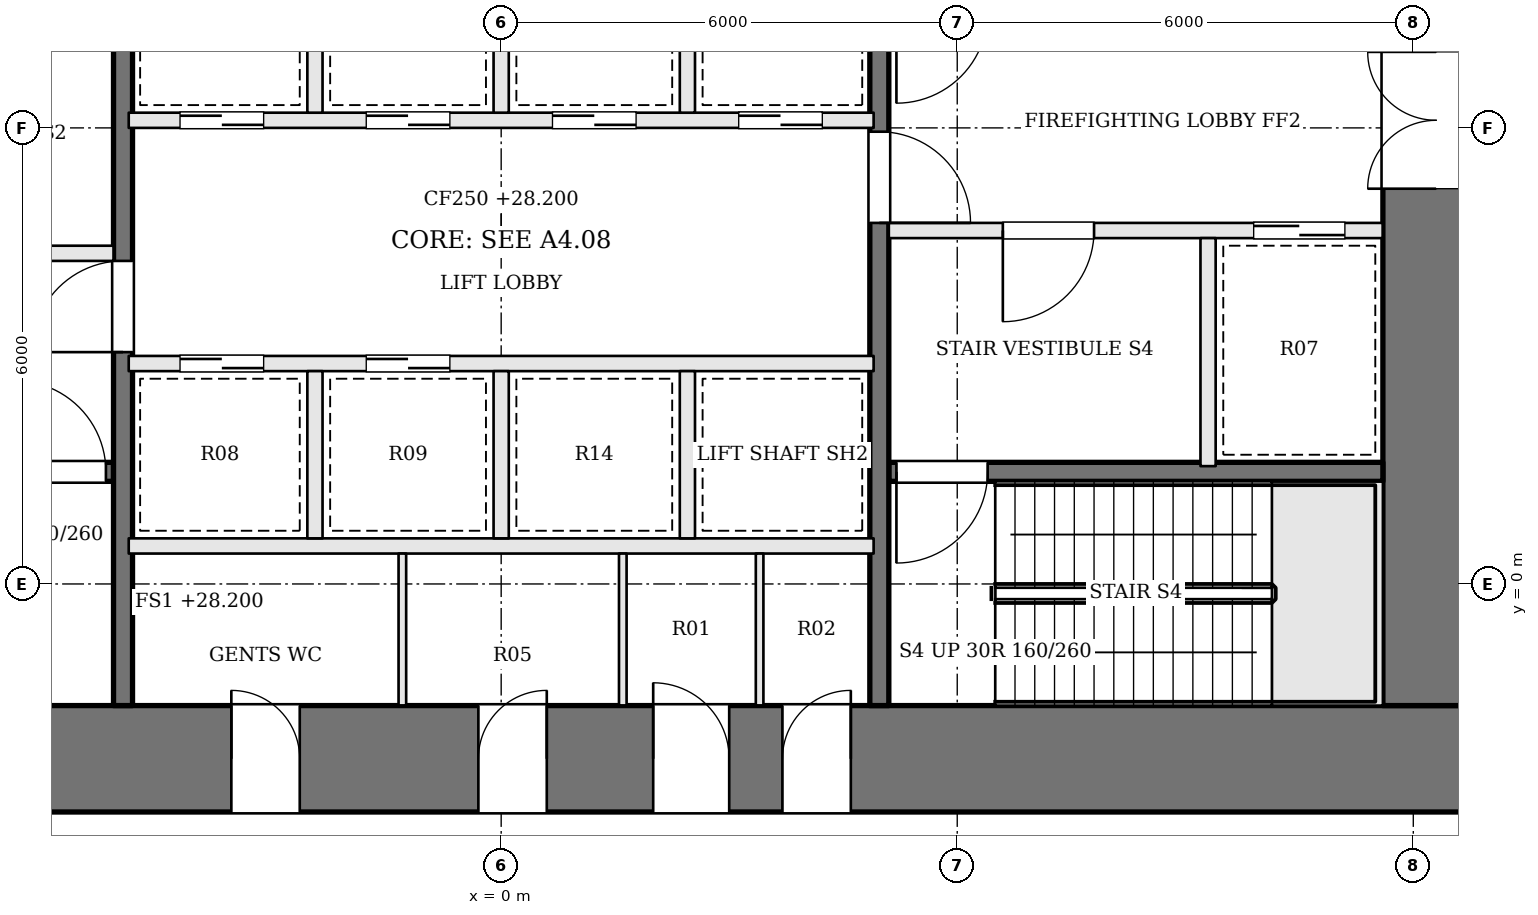
"""IFC4 building model, lengths in metres.
Left out: names, types, materials, properties, quantities, classifications, styles, units other than length and angle.
Written with IfcOpenShell. Run it as: python <this file> out.ifc"""

import sys

from ifc_helpers import new_model, si_unit, direction, frame, frame_2d, origin, place, context, subcontext, project, spatial, rectangle, extrude, element, fill, save


model = new_model("IFC4")
c1 = context("Model", 3, precision=1e-05, world=origin(), true_north=direction((0.0, 1.0)))
c2 = subcontext(c1, "Body", "Model", "MODEL_VIEW")
j1 = project(units=[si_unit("LENGTHUNIT", "METRE"), si_unit("PLANEANGLEUNIT", "RADIAN")], contexts=[c1])
p1 = place(None, origin())
s1 = spatial("IfcSite", under=j1, at=p1, CompositionType="ELEMENT")
p2 = place(p1, origin())
s2 = spatial("IfcBuilding", under=s1, at=p2, CompositionType="ELEMENT")
p3 = place(p2, frame((0.0, 0.0, 28.2)))
s3 = spatial("IfcBuildingStorey", under=s2, at=p3, CompositionType="ELEMENT", Elevation=28.2)
p4 = place(p3, frame((-13.0, -2.3, 0.0), z_axis=(0.0, 0.0, 1.0), x_axis=(1.0, 0.0, 0.0)))
e1 = element("IfcWall", 1, at=p4, inside=s3, PredefinedType="SHEAR", context=c2, shape_type="SweptSolid", body=[
    extrude(rectangle(XDim=26.0, YDim=1.4, at=frame_2d((13.0, 0.0))), origin(), (0.0, 0.0, 1.0), 4.8),
])
p5 = place(p4, frame((9.45, 0.0, 0.0)))
e2 = element("IfcOpeningElement", 2, at=p5, cuts=e1, PredefinedType="OPENING", context=c2, shape_type="SweptSolid", body=[
    extrude(rectangle(XDim=0.9, YDim=2.1, at=frame_2d((0.45, 1.05))), frame((0.0, 0.71, 0.0), z_axis=(0.0, -1.0, 0.0), x_axis=(1.0, 0.0, 0.0)), (0.0, 0.0, 1.0), 1.42),
])
p6 = place(p4, frame((12.7, 0.0, 0.0)))
e3 = element("IfcOpeningElement", 3, at=p6, cuts=e1, PredefinedType="OPENING", context=c2, shape_type="SweptSolid", body=[
    extrude(rectangle(XDim=0.9, YDim=2.1, at=frame_2d((0.45, 1.05))), frame((0.0, 0.71, 0.0), z_axis=(0.0, -1.0, 0.0), x_axis=(1.0, 0.0, 0.0)), (0.0, 0.0, 1.0), 1.42),
])
p7 = place(p4, frame((15.0, 0.0, 0.0)))
e4 = element("IfcOpeningElement", 4, at=p7, cuts=e1, PredefinedType="OPENING", context=c2, shape_type="SweptSolid", body=[
    extrude(rectangle(XDim=1.0, YDim=2.1, at=frame_2d((0.5, 1.05))), frame((0.0, 0.71, 0.0), z_axis=(0.0, -1.0, 0.0), x_axis=(1.0, 0.0, 0.0)), (0.0, 0.0, 1.0), 1.42),
])
p8 = place(p4, frame((16.7, 0.0, 0.0)))
e5 = element("IfcOpeningElement", 5, at=p8, cuts=e1, PredefinedType="OPENING", context=c2, shape_type="SweptSolid", body=[
    extrude(rectangle(XDim=0.9, YDim=2.1, at=frame_2d((0.45, 1.05))), frame((0.0, 0.71, 0.0), z_axis=(0.0, -1.0, 0.0), x_axis=(1.0, 0.0, 0.0)), (0.0, 0.0, 1.0), 1.42),
])
p9 = place(p3, frame((12.3, -1.6, 0.0), z_axis=(0.0, 0.0, 1.0), x_axis=(0.0, 1.0, 0.0)))
e6 = element("IfcWall", 6, at=p9, inside=s3, PredefinedType="SHEAR", context=c2, shape_type="SweptSolid", body=[
    extrude(rectangle(XDim=12.2, YDim=1.4, at=frame_2d((6.1, 0.0))), origin(), (0.0, 0.0, 1.0), 4.8),
])
p10 = place(p9, frame((6.8, 0.0, 0.0)))
e7 = element("IfcOpeningElement", 7, at=p10, cuts=e6, PredefinedType="OPENING", context=c2, shape_type="SweptSolid", body=[
    extrude(rectangle(XDim=1.8, YDim=2.1, at=frame_2d((0.9, 1.05))), frame((0.0, 0.71, 0.0), z_axis=(0.0, -1.0, 0.0), x_axis=(1.0, 0.0, 0.0)), (0.0, 0.0, 1.0), 1.42),
])
p11 = place(p3, frame((-11.6, 1.475, 0.0), z_axis=(0.0, 0.0, 1.0), x_axis=(1.0, 0.0, 0.0)))
e8 = element("IfcWall", 8, at=p11, inside=s3, PredefinedType="SOLIDWALL", context=c2, shape_type="SweptSolid", body=[
    extrude(rectangle(XDim=6.5, YDim=0.25, at=frame_2d((3.25, 0.0))), origin(), (0.0, 0.0, 1.0), 4.5),
])
p12 = place(p11, frame((5.2, 0.0, 0.0)))
e9 = element("IfcOpeningElement", 9, at=p12, cuts=e8, PredefinedType="OPENING", context=c2, shape_type="SweptSolid", body=[
    extrude(rectangle(XDim=1.2, YDim=2.1, at=frame_2d((0.6, 1.05))), frame((0.0, 0.135, 0.0), z_axis=(0.0, -1.0, 0.0), x_axis=(1.0, 0.0, 0.0)), (0.0, 0.0, 1.0), 0.27),
])
p13 = place(p3, frame((-11.6, 4.35, 0.0), z_axis=(0.0, 0.0, 1.0), x_axis=(1.0, 0.0, 0.0)))
e10 = element("IfcWall", 10, at=p13, inside=s3, PredefinedType="SOLIDWALL", context=c2, shape_type="SweptSolid", body=[
    extrude(rectangle(XDim=6.5, YDim=0.2, at=frame_2d((3.25, 0.0))), origin(), (0.0, 0.0, 1.0), 4.5),
])
p14 = place(p13, frame((3.8, 0.0, 0.0)))
e11 = element("IfcOpeningElement", 11, at=p14, cuts=e10, PredefinedType="OPENING", context=c2, shape_type="SweptSolid", body=[
    extrude(rectangle(XDim=1.2, YDim=2.1, at=frame_2d((0.6, 1.05))), frame((0.0, 0.11, 0.0), z_axis=(0.0, -1.0, 0.0), x_axis=(1.0, 0.0, 0.0)), (0.0, 0.0, 1.0), 0.22),
])
p15 = place(p13, frame((0.5, 0.0, 0.0)))
e12 = element("IfcOpeningElement", 12, at=p15, cuts=e10, PredefinedType="OPENING", context=c2, shape_type="SweptSolid", body=[
    extrude(rectangle(XDim=1.2, YDim=2.1, at=frame_2d((0.6, 1.05))), frame((0.0, 0.11, 0.0), z_axis=(0.0, -1.0, 0.0), x_axis=(1.0, 0.0, 0.0)), (0.0, 0.0, 1.0), 0.22),
])
p16 = place(p3, frame((11.6, 4.65, 0.0), z_axis=(0.0, 0.0, 1.0), x_axis=(-1.0, 0.0, 0.0)))
e13 = element("IfcWall", 13, at=p16, inside=s3, PredefinedType="SOLIDWALL", context=c2, shape_type="SweptSolid", body=[
    extrude(rectangle(XDim=6.5, YDim=0.2, at=frame_2d((3.25, 0.0))), origin(), (0.0, 0.0, 1.0), 4.5),
])
p17 = place(p16, frame((3.8, 0.0, 0.0)))
e14 = element("IfcOpeningElement", 14, at=p17, cuts=e13, PredefinedType="OPENING", context=c2, shape_type="SweptSolid", body=[
    extrude(rectangle(XDim=1.2, YDim=2.1, at=frame_2d((0.6, 1.05))), frame((0.0, 0.11, 0.0), z_axis=(0.0, -1.0, 0.0), x_axis=(1.0, 0.0, 0.0)), (0.0, 0.0, 1.0), 0.22),
])
p18 = place(p16, frame((0.5, 0.0, 0.0)))
e15 = element("IfcOpeningElement", 15, at=p18, cuts=e13, PredefinedType="OPENING", context=c2, shape_type="SweptSolid", body=[
    extrude(rectangle(XDim=1.2, YDim=2.1, at=frame_2d((0.6, 1.05))), frame((0.0, 0.11, 0.0), z_axis=(0.0, -1.0, 0.0), x_axis=(1.0, 0.0, 0.0)), (0.0, 0.0, 1.0), 0.22),
])
p19 = place(p3, frame((11.6, 1.475, 0.0), z_axis=(0.0, 0.0, 1.0), x_axis=(-1.0, 0.0, 0.0)))
e16 = element("IfcWall", 16, at=p19, inside=s3, PredefinedType="SOLIDWALL", context=c2, shape_type="SweptSolid", body=[
    extrude(rectangle(XDim=6.5, YDim=0.25, at=frame_2d((3.25, 0.0))), origin(), (0.0, 0.0, 1.0), 4.5),
])
p20 = place(p19, frame((5.2, 0.0, 0.0)))
e17 = element("IfcOpeningElement", 17, at=p20, cuts=e16, PredefinedType="OPENING", context=c2, shape_type="SweptSolid", body=[
    extrude(rectangle(XDim=1.2, YDim=2.1, at=frame_2d((0.6, 1.05))), frame((0.0, 0.135, 0.0), z_axis=(0.0, -1.0, 0.0), x_axis=(1.0, 0.0, 0.0)), (0.0, 0.0, 1.0), 0.27),
])
p21 = place(p3, frame((9.3, 4.55, 0.0), z_axis=(0.0, 0.0, 1.0), x_axis=(0.0, -1.0, 0.0)))
e18 = element("IfcWall", 18, at=p21, inside=s3, PredefinedType="SOLIDWALL", context=c2, shape_type="SweptSolid", body=[
    extrude(rectangle(XDim=3.0, YDim=0.2, at=frame_2d((1.5, 0.0))), origin(), (0.0, 0.0, 1.0), 4.5),
])
p22 = place(p3, frame((-4.975, -1.6, 0.0), z_axis=(0.0, 0.0, 1.0), x_axis=(0.0, 1.0, 0.0)))
e19 = element("IfcWall", 19, at=p22, inside=s3, PredefinedType="SOLIDWALL", context=c2, shape_type="SweptSolid", body=[
    extrude(rectangle(XDim=12.2, YDim=0.25, at=frame_2d((6.1, 0.0))), origin(), (0.0, 0.0, 1.0), 4.5),
])
p23 = place(p22, frame((4.65, 0.0, 0.0)))
e20 = element("IfcOpeningElement", 20, at=p23, cuts=e19, PredefinedType="OPENING", context=c2, shape_type="SweptSolid", body=[
    extrude(rectangle(XDim=1.2, YDim=2.1, at=frame_2d((0.6, 1.05))), frame((0.0, 0.135, 0.0), z_axis=(0.0, -1.0, 0.0), x_axis=(1.0, 0.0, 0.0)), (0.0, 0.0, 1.0), 0.27),
])
p24 = place(p3, frame((4.975, 10.6, 0.0), z_axis=(0.0, 0.0, 1.0), x_axis=(0.0, -1.0, 0.0)))
e21 = element("IfcWall", 21, at=p24, inside=s3, PredefinedType="SOLIDWALL", context=c2, shape_type="SweptSolid", body=[
    extrude(rectangle(XDim=12.2, YDim=0.25, at=frame_2d((6.1, 0.0))), origin(), (0.0, 0.0, 1.0), 4.5),
])
p25 = place(p24, frame((4.65, 0.0, 0.0)))
e22 = element("IfcOpeningElement", 22, at=p25, cuts=e21, PredefinedType="OPENING", context=c2, shape_type="SweptSolid", body=[
    extrude(rectangle(XDim=1.2, YDim=2.1, at=frame_2d((0.6, 1.05))), frame((0.0, 0.135, 0.0), z_axis=(0.0, -1.0, 0.0), x_axis=(1.0, 0.0, 0.0)), (0.0, 0.0, 1.0), 0.27),
])
p26 = place(p3, frame((-4.9, 0.5, 0.0), z_axis=(0.0, 0.0, 1.0), x_axis=(1.0, 0.0, 0.0)))
e23 = element("IfcWall", 23, at=p26, inside=s3, PredefinedType="SOLIDWALL", context=c2, shape_type="SweptSolid", body=[
    extrude(rectangle(XDim=9.8, YDim=0.2, at=frame_2d((4.9, 0.0))), origin(), (0.0, 0.0, 1.0), 4.5),
])
p27 = place(p3, frame((-4.9, 2.9, 0.0), z_axis=(0.0, 0.0, 1.0), x_axis=(1.0, 0.0, 0.0)))
e24 = element("IfcWall", 24, at=p27, inside=s3, PredefinedType="SOLIDWALL", context=c2, shape_type="SweptSolid", body=[
    extrude(rectangle(XDim=9.8, YDim=0.2, at=frame_2d((4.9, 0.0))), origin(), (0.0, 0.0, 1.0), 4.5),
])
p28 = place(p27, frame((0.675, 0.0, 0.0)))
e25 = element("IfcOpeningElement", 25, at=p28, cuts=e24, PredefinedType="OPENING", context=c2, shape_type="SweptSolid", body=[
    extrude(rectangle(XDim=1.1, YDim=2.1, at=frame_2d((0.55, 1.05))), frame((0.0, 0.11, 0.0), z_axis=(0.0, -1.0, 0.0), x_axis=(1.0, 0.0, 0.0)), (0.0, 0.0, 1.0), 0.22),
])
p29 = place(p27, frame((3.125, 0.0, 0.0)))
e26 = element("IfcOpeningElement", 26, at=p29, cuts=e24, PredefinedType="OPENING", context=c2, shape_type="SweptSolid", body=[
    extrude(rectangle(XDim=1.1, YDim=2.1, at=frame_2d((0.55, 1.05))), frame((0.0, 0.11, 0.0), z_axis=(0.0, -1.0, 0.0), x_axis=(1.0, 0.0, 0.0)), (0.0, 0.0, 1.0), 0.22),
])
p30 = place(p3, frame((-4.9, 6.1, 0.0), z_axis=(0.0, 0.0, 1.0), x_axis=(1.0, 0.0, 0.0)))
e27 = element("IfcWall", 27, at=p30, inside=s3, PredefinedType="SOLIDWALL", context=c2, shape_type="SweptSolid", body=[
    extrude(rectangle(XDim=9.8, YDim=0.2, at=frame_2d((4.9, 0.0))), origin(), (0.0, 0.0, 1.0), 4.5),
])
p31 = place(p30, frame((0.675, 0.0, 0.0)))
e28 = element("IfcOpeningElement", 28, at=p31, cuts=e27, PredefinedType="OPENING", context=c2, shape_type="SweptSolid", body=[
    extrude(rectangle(XDim=1.1, YDim=2.1, at=frame_2d((0.55, 1.05))), frame((0.0, 0.11, 0.0), z_axis=(0.0, -1.0, 0.0), x_axis=(1.0, 0.0, 0.0)), (0.0, 0.0, 1.0), 0.22),
])
p32 = place(p30, frame((3.125, 0.0, 0.0)))
e29 = element("IfcOpeningElement", 29, at=p32, cuts=e27, PredefinedType="OPENING", context=c2, shape_type="SweptSolid", body=[
    extrude(rectangle(XDim=1.1, YDim=2.1, at=frame_2d((0.55, 1.05))), frame((0.0, 0.11, 0.0), z_axis=(0.0, -1.0, 0.0), x_axis=(1.0, 0.0, 0.0)), (0.0, 0.0, 1.0), 0.22),
])
p33 = place(p30, frame((5.575, 0.0, 0.0)))
e30 = element("IfcOpeningElement", 30, at=p33, cuts=e27, PredefinedType="OPENING", context=c2, shape_type="SweptSolid", body=[
    extrude(rectangle(XDim=1.1, YDim=2.1, at=frame_2d((0.55, 1.05))), frame((0.0, 0.11, 0.0), z_axis=(0.0, -1.0, 0.0), x_axis=(1.0, 0.0, 0.0)), (0.0, 0.0, 1.0), 0.22),
])
p34 = place(p30, frame((8.025, 0.0, 0.0)))
e31 = element("IfcOpeningElement", 31, at=p34, cuts=e27, PredefinedType="OPENING", context=c2, shape_type="SweptSolid", body=[
    extrude(rectangle(XDim=1.1, YDim=2.1, at=frame_2d((0.55, 1.05))), frame((0.0, 0.11, 0.0), z_axis=(0.0, -1.0, 0.0), x_axis=(1.0, 0.0, 0.0)), (0.0, 0.0, 1.0), 0.22),
])
for number, where, z_axis, x_axis in (
    (32, (-2.45, 0.6, 0.0), (0.0, 0.0, 1.0), (0.0, 1.0, 0.0)),
    (33, (0.0, 0.6, 0.0), (0.0, 0.0, 1.0), (0.0, 1.0, 0.0)),
    (34, (2.45, 0.6, 0.0), (0.0, 0.0, 1.0), (0.0, 1.0, 0.0)),
    (35, (-2.45, 6.2, 0.0), (0.0, 0.0, 1.0), (0.0, 1.0, 0.0)),
    (36, (0.0, 6.2, 0.0), (0.0, 0.0, 1.0), (0.0, 1.0, 0.0)),
    (37, (2.45, 6.2, 0.0), (0.0, 0.0, 1.0), (0.0, 1.0, 0.0)),
):
    element("IfcWall", number, at=place(p3, frame(where, z_axis=z_axis, x_axis=x_axis)), inside=s3, PredefinedType="SOLIDWALL", context=c2, shape_type="SweptSolid", body=[
        extrude(rectangle(XDim=2.2, YDim=0.2, at=frame_2d((1.1, 0.0))), origin(), (0.0, 0.0, 1.0), 4.5),
    ])
for number, where, z_axis, x_axis in (
    (38, (-1.3, -1.6, 0.0), (0.0, 0.0, 1.0), (0.0, 1.0, 0.0)),
    (39, (1.6, -1.6, 0.0), (0.0, 0.0, 1.0), (0.0, 1.0, 0.0)),
    (40, (3.4, -1.6, 0.0), (0.0, 0.0, 1.0), (0.0, 1.0, 0.0)),
):
    element("IfcWall", number, at=place(p3, frame(where, z_axis=z_axis, x_axis=x_axis)), inside=s3, PredefinedType="PARTITIONING", context=c2, shape_type="SweptSolid", body=[
        extrude(rectangle(XDim=2.0, YDim=0.1, at=frame_2d((1.0, 0.0))), origin(), (0.0, 0.0, 1.0), 4.5),
    ])
p35 = place(p10, origin())
e41 = element("IfcDoor", 41, at=p35, inside=s3, OperationType="DOUBLE_DOOR_SINGLE_SWING", PredefinedType="DOOR", context=c2, shape_type="SweptSolid", body=[
    extrude(rectangle(XDim=1.8, YDim=2.1, at=frame_2d((0.9, 1.05))), frame((0.0, 0.025, 0.0), z_axis=(0.0, -1.0, 0.0), x_axis=(1.0, 0.0, 0.0)), (0.0, 0.0, 1.0), 0.05),
])
fill(e7, e41)
p36 = place(p23, origin())
e42 = element("IfcDoor", 42, at=p36, inside=s3, OperationType="SINGLE_SWING_LEFT", PredefinedType="DOOR", context=c2, shape_type="SweptSolid", body=[
    extrude(rectangle(XDim=1.2, YDim=2.1, at=frame_2d((0.6, 1.05))), frame((0.0, 0.025, 0.0), z_axis=(0.0, -1.0, 0.0), x_axis=(1.0, 0.0, 0.0)), (0.0, 0.0, 1.0), 0.05),
])
fill(e20, e42)
p37 = place(p25, origin())
e43 = element("IfcDoor", 43, at=p37, inside=s3, OperationType="SINGLE_SWING_RIGHT", PredefinedType="DOOR", context=c2, shape_type="SweptSolid", body=[
    extrude(rectangle(XDim=1.2, YDim=2.1, at=frame_2d((0.6, 1.05))), frame((0.0, 0.025, 0.0), z_axis=(0.0, -1.0, 0.0), x_axis=(1.0, 0.0, 0.0)), (0.0, 0.0, 1.0), 0.05),
])
fill(e22, e43)
p38 = place(p17, origin())
e44 = element("IfcDoor", 44, at=p38, inside=s3, OperationType="SINGLE_SWING_RIGHT", PredefinedType="DOOR", context=c2, shape_type="SweptSolid", body=[
    extrude(rectangle(XDim=1.2, YDim=2.1, at=frame_2d((0.6, 1.05))), frame((0.0, 0.025, 0.0), z_axis=(0.0, -1.0, 0.0), x_axis=(1.0, 0.0, 0.0)), (0.0, 0.0, 1.0), 0.05),
])
fill(e14, e44)
p39 = place(p12, origin())
e45 = element("IfcDoor", 45, at=p39, inside=s3, OperationType="SINGLE_SWING_LEFT", PredefinedType="DOOR", context=c2, shape_type="SweptSolid", body=[
    extrude(rectangle(XDim=1.2, YDim=2.1, at=frame_2d((0.6, 1.05))), frame((0.0, 0.025, 0.0), z_axis=(0.0, -1.0, 0.0), x_axis=(1.0, 0.0, 0.0)), (0.0, 0.0, 1.0), 0.05),
])
fill(e9, e45)
p40 = place(p20, origin())
e46 = element("IfcDoor", 46, at=p40, inside=s3, OperationType="SINGLE_SWING_RIGHT", PredefinedType="DOOR", context=c2, shape_type="SweptSolid", body=[
    extrude(rectangle(XDim=1.2, YDim=2.1, at=frame_2d((0.6, 1.05))), frame((0.0, 0.025, 0.0), z_axis=(0.0, -1.0, 0.0), x_axis=(1.0, 0.0, 0.0)), (0.0, 0.0, 1.0), 0.05),
])
fill(e17, e46)
p41 = place(p18, origin())
e47 = element("IfcDoor", 47, at=p41, inside=s3, OperationType="SLIDING_TO_RIGHT", PredefinedType="DOOR", context=c2, shape_type="SweptSolid", body=[
    extrude(rectangle(XDim=1.2, YDim=2.1, at=frame_2d((0.6, 1.05))), frame((0.0, 0.025, 0.0), z_axis=(0.0, -1.0, 0.0), x_axis=(1.0, 0.0, 0.0)), (0.0, 0.0, 1.0), 0.05),
])
fill(e15, e47)
p42 = place(p28, origin())
e48 = element("IfcDoor", 48, at=p42, inside=s3, OperationType="SLIDING_TO_RIGHT", PredefinedType="DOOR", context=c2, shape_type="SweptSolid", body=[
    extrude(rectangle(XDim=1.1, YDim=2.1, at=frame_2d((0.55, 1.05))), frame((0.0, 0.025, 0.0), z_axis=(0.0, -1.0, 0.0), x_axis=(1.0, 0.0, 0.0)), (0.0, 0.0, 1.0), 0.05),
])
fill(e25, e48)
p43 = place(p29, origin())
e49 = element("IfcDoor", 49, at=p43, inside=s3, OperationType="SLIDING_TO_LEFT", PredefinedType="DOOR", context=c2, shape_type="SweptSolid", body=[
    extrude(rectangle(XDim=1.1, YDim=2.1, at=frame_2d((0.55, 1.05))), frame((0.0, 0.025, 0.0), z_axis=(0.0, -1.0, 0.0), x_axis=(1.0, 0.0, 0.0)), (0.0, 0.0, 1.0), 0.05),
])
fill(e26, e49)
p44 = place(p31, origin())
e50 = element("IfcDoor", 50, at=p44, inside=s3, OperationType="SLIDING_TO_RIGHT", PredefinedType="DOOR", context=c2, shape_type="SweptSolid", body=[
    extrude(rectangle(XDim=1.1, YDim=2.1, at=frame_2d((0.55, 1.05))), frame((0.0, 0.025, 0.0), z_axis=(0.0, -1.0, 0.0), x_axis=(1.0, 0.0, 0.0)), (0.0, 0.0, 1.0), 0.05),
])
fill(e28, e50)
p45 = place(p32, origin())
e51 = element("IfcDoor", 51, at=p45, inside=s3, OperationType="SLIDING_TO_LEFT", PredefinedType="DOOR", context=c2, shape_type="SweptSolid", body=[
    extrude(rectangle(XDim=1.1, YDim=2.1, at=frame_2d((0.55, 1.05))), frame((0.0, 0.025, 0.0), z_axis=(0.0, -1.0, 0.0), x_axis=(1.0, 0.0, 0.0)), (0.0, 0.0, 1.0), 0.05),
])
fill(e29, e51)
p46 = place(p33, origin())
e52 = element("IfcDoor", 52, at=p46, inside=s3, OperationType="SLIDING_TO_RIGHT", PredefinedType="DOOR", context=c2, shape_type="SweptSolid", body=[
    extrude(rectangle(XDim=1.1, YDim=2.1, at=frame_2d((0.55, 1.05))), frame((0.0, 0.025, 0.0), z_axis=(0.0, -1.0, 0.0), x_axis=(1.0, 0.0, 0.0)), (0.0, 0.0, 1.0), 0.05),
])
fill(e30, e52)
p47 = place(p34, origin())
e53 = element("IfcDoor", 53, at=p47, inside=s3, OperationType="SLIDING_TO_LEFT", PredefinedType="DOOR", context=c2, shape_type="SweptSolid", body=[
    extrude(rectangle(XDim=1.1, YDim=2.1, at=frame_2d((0.55, 1.05))), frame((0.0, 0.025, 0.0), z_axis=(0.0, -1.0, 0.0), x_axis=(1.0, 0.0, 0.0)), (0.0, 0.0, 1.0), 0.05),
])
fill(e31, e53)
p48 = place(p5, origin())
e54 = element("IfcDoor", 54, at=p48, inside=s3, OperationType="SINGLE_SWING_LEFT", PredefinedType="DOOR", context=c2, shape_type="SweptSolid", body=[
    extrude(rectangle(XDim=0.9, YDim=2.1, at=frame_2d((0.45, 1.05))), frame((0.0, 0.025, 0.0), z_axis=(0.0, -1.0, 0.0), x_axis=(1.0, 0.0, 0.0)), (0.0, 0.0, 1.0), 0.05),
])
fill(e2, e54)
p49 = place(p6, origin())
e55 = element("IfcDoor", 55, at=p49, inside=s3, OperationType="SINGLE_SWING_RIGHT", PredefinedType="DOOR", context=c2, shape_type="SweptSolid", body=[
    extrude(rectangle(XDim=0.9, YDim=2.1, at=frame_2d((0.45, 1.05))), frame((0.0, 0.025, 0.0), z_axis=(0.0, -1.0, 0.0), x_axis=(1.0, 0.0, 0.0)), (0.0, 0.0, 1.0), 0.05),
])
fill(e3, e55)
p50 = place(p7, origin())
e56 = element("IfcDoor", 56, at=p50, inside=s3, OperationType="SINGLE_SWING_LEFT", PredefinedType="DOOR", context=c2, shape_type="SweptSolid", body=[
    extrude(rectangle(XDim=1.0, YDim=2.1, at=frame_2d((0.5, 1.05))), frame((0.0, 0.025, 0.0), z_axis=(0.0, -1.0, 0.0), x_axis=(1.0, 0.0, 0.0)), (0.0, 0.0, 1.0), 0.05),
])
fill(e4, e56)
p51 = place(p8, origin())
e57 = element("IfcDoor", 57, at=p51, inside=s3, OperationType="SINGLE_SWING_RIGHT", PredefinedType="DOOR", context=c2, shape_type="SweptSolid", body=[
    extrude(rectangle(XDim=0.9, YDim=2.1, at=frame_2d((0.45, 1.05))), frame((0.0, 0.025, 0.0), z_axis=(0.0, -1.0, 0.0), x_axis=(1.0, 0.0, 0.0)), (0.0, 0.0, 1.0), 0.05),
])
fill(e5, e57)
save(model, sys.argv[1])
